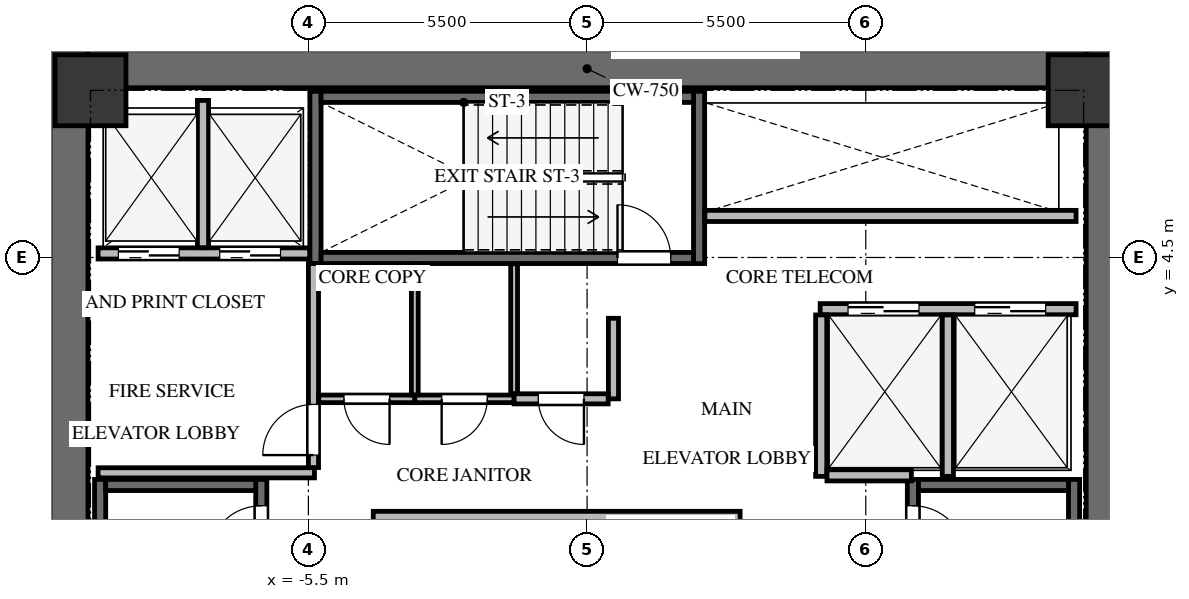
"""IFC4 building model, lengths in metres.
Left out: names, types, materials, properties, quantities, classifications, styles, units other than length and angle.
Written with IfcOpenShell. Run it as: python <this file> out.ifc"""

import sys

from ifc_helpers import new_model, si_unit, direction, frame, frame_2d, origin, origin_2d, place, context, subcontext, project, spatial, rectangle, extrude, source, transform, mapped, element, fill, save


model = new_model("IFC4")
c1 = context("Model", 3, precision=1e-05, world=origin(), true_north=direction((0.0, 1.0)))
c2 = subcontext(c1, "Body", "Model", "MODEL_VIEW")
j1 = project(units=[si_unit("LENGTHUNIT", "METRE"), si_unit("PLANEANGLEUNIT", "RADIAN")], contexts=[c1])
p1 = place(None, origin())
s1 = spatial("IfcSite", under=j1, at=p1, CompositionType="ELEMENT")
p2 = place(p1, origin())
s2 = spatial("IfcBuilding", under=s1, at=p2, CompositionType="ELEMENT")
p3 = place(p2, frame((0.0, 0.0, 146.1)))
s3 = spatial("IfcBuildingStorey", under=s2, at=p3, CompositionType="ELEMENT", Elevation=146.1)
for number, where, z_axis, x_axis in (
    (1, (-10.225, -8.6, 0.0), (0.0, 0.0, 1.0), (0.0, 1.0, 0.0)),
    (2, (10.225, -8.6, 0.0), (0.0, 0.0, 1.0), (0.0, 1.0, 0.0)),
):
    element("IfcWall", number, at=place(p3, frame(where, z_axis=z_axis, x_axis=x_axis)), inside=s3, PredefinedType="SHEAR", context=c2, shape_type="SweptSolid", body=[
        extrude(rectangle(XDim=17.2, YDim=0.75, at=frame_2d((8.6, 0.0))), origin(), (0.0, 0.0, 1.0), 4.2),
    ])
p4 = place(p3, frame((-9.85, 8.225, 0.0), z_axis=(0.0, 0.0, 1.0), x_axis=(1.0, 0.0, 0.0)))
e3 = element("IfcWall", 3, at=p4, inside=s3, PredefinedType="SHEAR", context=c2, shape_type="SweptSolid", body=[
    extrude(rectangle(XDim=19.7, YDim=0.75, at=frame_2d((9.85, 0.0))), origin(), (0.0, 0.0, 1.0), 4.2),
])
p5 = place(p3, frame((-6.43, -7.77, -0.24), z_axis=(0.0, 0.0, 1.0), x_axis=(0.0, 1.0, 0.0)))
e4 = element("IfcWall", 4, at=p5, inside=s3, PredefinedType="SHEAR", context=c2, shape_type="SweptSolid", body=[
    extrude(rectangle(XDim=7.89, YDim=0.22, at=frame_2d((3.945, 0.0))), origin(), (0.0, 0.0, 1.0), 4.12),
])
p6 = place(p5, frame((6.32, 0.0, 0.0)))
e5 = element("IfcOpeningElement", 5, at=p6, cuts=e4, PredefinedType="OPENING", context=c2, shape_type="SweptSolid", body=[
    extrude(rectangle(XDim=1.05, YDim=2.15, at=frame_2d((0.525, 1.075))), frame((0.0, 0.12, 0.0), z_axis=(0.0, -1.0, 0.0), x_axis=(1.0, 0.0, 0.0)), (0.0, 0.0, 1.0), 0.24),
])
p7 = place(p3, frame((-9.61, 0.12, -0.24), z_axis=(0.0, 0.0, 1.0), x_axis=(0.0, -1.0, 0.0)))
e6 = element("IfcWall", 6, at=p7, inside=s3, PredefinedType="SHEAR", context=c2, shape_type="SweptSolid", body=[
    extrude(rectangle(XDim=7.89, YDim=0.22, at=frame_2d((3.945, 0.0))), origin(), (0.0, 0.0, 1.0), 4.12),
])
p8 = place(p3, frame((-6.54, 0.01, -0.24), z_axis=(0.0, 0.0, 1.0), x_axis=(-1.0, 0.0, 0.0)))
e7 = element("IfcWall", 7, at=p8, inside=s3, PredefinedType="SHEAR", context=c2, shape_type="SweptSolid", body=[
    extrude(rectangle(XDim=2.96, YDim=0.22, at=frame_2d((1.48, 0.0))), origin(), (0.0, 0.0, 1.0), 4.12),
])
p9 = place(p3, frame((9.61, -7.77, -0.24), z_axis=(0.0, 0.0, 1.0), x_axis=(0.0, 1.0, 0.0)))
e8 = element("IfcWall", 8, at=p9, inside=s3, PredefinedType="SHEAR", context=c2, shape_type="SweptSolid", body=[
    extrude(rectangle(XDim=7.89, YDim=0.22, at=frame_2d((3.945, 0.0))), origin(), (0.0, 0.0, 1.0), 4.12),
])
p10 = place(p3, frame((6.43, 0.12, -0.24), z_axis=(0.0, 0.0, 1.0), x_axis=(0.0, -1.0, 0.0)))
e9 = element("IfcWall", 9, at=p10, inside=s3, PredefinedType="SHEAR", context=c2, shape_type="SweptSolid", body=[
    extrude(rectangle(XDim=7.89, YDim=0.22, at=frame_2d((3.945, 0.0))), origin(), (0.0, 0.0, 1.0), 4.12),
])
p11 = place(p10, frame((0.52, 0.0, 0.0)))
e10 = element("IfcOpeningElement", 10, at=p11, cuts=e9, PredefinedType="OPENING", context=c2, shape_type="SweptSolid", body=[
    extrude(rectangle(XDim=1.05, YDim=2.15, at=frame_2d((0.525, 1.075))), frame((0.0, 0.12, 0.0), z_axis=(0.0, -1.0, 0.0), x_axis=(1.0, 0.0, 0.0)), (0.0, 0.0, 1.0), 0.24),
])
p12 = place(p3, frame((9.5, 0.01, -0.24), z_axis=(0.0, 0.0, 1.0), x_axis=(-1.0, 0.0, 0.0)))
e11 = element("IfcWall", 11, at=p12, inside=s3, PredefinedType="SHEAR", context=c2, shape_type="SweptSolid", body=[
    extrude(rectangle(XDim=2.96, YDim=0.22, at=frame_2d((1.48, 0.0))), origin(), (0.0, 0.0, 1.0), 4.12),
])
for number, where, z_axis, x_axis in (
    (12, (2.21, 4.38, -0.24), (0.0, 0.0, 1.0), (0.0, 1.0, 0.0)),
    (13, (-5.36, 7.78, -0.24), (0.0, 0.0, 1.0), (0.0, -1.0, 0.0)),
):
    element("IfcWall", number, at=place(p3, frame(where, z_axis=z_axis, x_axis=x_axis)), inside=s3, PredefinedType="SHEAR", context=c2, shape_type="SweptSolid", body=[
        extrude(rectangle(XDim=3.4, YDim=0.22, at=frame_2d((1.7, 0.0))), origin(), (0.0, 0.0, 1.0), 4.12),
    ])
p13 = place(p3, frame((-5.25, 4.49, -0.24), z_axis=(0.0, 0.0, 1.0), x_axis=(1.0, 0.0, 0.0)))
e14 = element("IfcWall", 14, at=p13, inside=s3, PredefinedType="SHEAR", context=c2, shape_type="SweptSolid", body=[
    extrude(rectangle(XDim=7.35, YDim=0.22, at=frame_2d((3.675, 0.0))), origin(), (0.0, 0.0, 1.0), 4.12),
])
p14 = place(p13, frame((5.85, 0.0, 0.0)))
e15 = element("IfcOpeningElement", 15, at=p14, cuts=e14, PredefinedType="OPENING", context=c2, shape_type="SweptSolid", body=[
    extrude(rectangle(XDim=1.05, YDim=2.15, at=frame_2d((0.525, 1.075))), frame((0.0, 0.12, 0.0), z_axis=(0.0, -1.0, 0.0), x_axis=(1.0, 0.0, 0.0)), (0.0, 0.0, 1.0), 0.24),
])
p15 = place(p3, frame((2.1, 7.67, -0.24), z_axis=(0.0, 0.0, 1.0), x_axis=(-1.0, 0.0, 0.0)))
e16 = element("IfcWall", 16, at=p15, inside=s3, PredefinedType="SHEAR", context=c2, shape_type="SweptSolid", body=[
    extrude(rectangle(XDim=7.35, YDim=0.22, at=frame_2d((3.675, 0.0))), origin(), (0.0, 0.0, 1.0), 4.12),
])
m1 = source(origin(), c2, "Body", "SweptSolid", [
    extrude(rectangle(XDim=1.4, YDim=1.4, at=origin_2d()), origin(), (0.0, 0.0, 1.0), 4.12),
])
for number, where, z_axis, x_axis in (
    (17, (9.8, 7.8, -0.24), (0.0, 0.0, 1.0), (1.0, 0.0, 0.0)),
    (18, (-9.8, 7.8, -0.24), (0.0, 0.0, 1.0), (1.0, 0.0, 0.0)),
):
    element("IfcColumn", number, at=place(p3, frame(where, z_axis=z_axis, x_axis=x_axis)), inside=s3, PredefinedType="COLUMN", context=c2, shape_type="MappedRepresentation", body=[
        mapped(m1, transform((0.0, 0.0, 0.0), x_axis=(1.0, 0.0, 0.0), y_axis=(0.0, 1.0, 0.0), z_axis=(0.0, 0.0, 1.0), scale=1.0)),
    ])
p16 = place(p3, frame((-9.65, 4.58, 0.0), z_axis=(0.0, 0.0, 1.0), x_axis=(1.0, 0.0, 0.0)))
e19 = element("IfcWall", 19, at=p16, inside=s3, PredefinedType="SOLIDWALL", context=c2, shape_type="SweptSolid", body=[
    extrude(rectangle(XDim=4.175, YDim=0.22, at=frame_2d((2.087, 0.0))), origin(), (0.0, 0.0, 1.0), 3.865),
])
p17 = place(p16, frame((0.4, 0.0, 0.0)))
e20 = element("IfcOpeningElement", 20, at=p17, cuts=e19, PredefinedType="OPENING", context=c2, shape_type="SweptSolid", body=[
    extrude(rectangle(XDim=1.2, YDim=2.15, at=frame_2d((0.6, 1.075))), frame((0.0, 0.12, 0.0), z_axis=(0.0, -1.0, 0.0), x_axis=(1.0, 0.0, 0.0)), (0.0, 0.0, 1.0), 0.24),
])
p18 = place(p16, frame((2.4, 0.0, 0.0)))
e21 = element("IfcOpeningElement", 21, at=p18, cuts=e19, PredefinedType="OPENING", context=c2, shape_type="SweptSolid", body=[
    extrude(rectangle(XDim=1.2, YDim=2.15, at=frame_2d((0.6, 1.075))), frame((0.0, 0.12, 0.0), z_axis=(0.0, -1.0, 0.0), x_axis=(1.0, 0.0, 0.0)), (0.0, 0.0, 1.0), 0.24),
])
p19 = place(p3, frame((-7.58, 4.694, 0.0), z_axis=(0.0, 0.0, 1.0), x_axis=(0.0, 1.0, 0.0)))
e22 = element("IfcWall", 22, at=p19, inside=s3, PredefinedType="SOLIDWALL", context=c2, shape_type="SweptSolid", body=[
    extrude(rectangle(XDim=2.906, YDim=0.22, at=frame_2d((1.453, 0.0))), origin(), (0.0, 0.0, 1.0), 3.865),
])
p20 = place(p3, frame((-9.65, 0.25, 0.0), z_axis=(0.0, 0.0, 1.0), x_axis=(1.0, 0.0, 0.0)))
e23 = element("IfcWall", 23, at=p20, inside=s3, PredefinedType="SOLIDWALL", context=c2, shape_type="SweptSolid", body=[
    extrude(rectangle(XDim=4.27, YDim=0.2, at=frame_2d((2.135, 0.0))), origin(), (0.0, 0.0, 1.0), 3.865),
])
p21 = place(p3, frame((-5.4, 0.354, 0.0), z_axis=(0.0, 0.0, 1.0), x_axis=(0.0, 1.0, 0.0)))
e24 = element("IfcWall", 24, at=p21, inside=s3, PredefinedType="SOLIDWALL", context=c2, shape_type="SweptSolid", body=[
    extrude(rectangle(XDim=4.026, YDim=0.2, at=frame_2d((2.013, 0.0))), origin(), (0.0, 0.0, 1.0), 3.865),
])
p22 = place(p21, frame((0.246, 0.0, 0.0)))
e25 = element("IfcOpeningElement", 25, at=p22, cuts=e24, PredefinedType="OPENING", context=c2, shape_type="SweptSolid", body=[
    extrude(rectangle(XDim=1.0, YDim=2.15, at=frame_2d((0.5, 1.075))), frame((0.0, 0.11, 0.0), z_axis=(0.0, -1.0, 0.0), x_axis=(1.0, 0.0, 0.0)), (0.0, 0.0, 1.0), 0.22),
])
p23 = place(p3, frame((4.6, 3.48, 0.0), z_axis=(0.0, 0.0, 1.0), x_axis=(1.0, 0.0, 0.0)))
e26 = element("IfcWall", 26, at=p23, inside=s3, PredefinedType="SOLIDWALL", context=c2, shape_type="SweptSolid", body=[
    extrude(rectangle(XDim=5.05, YDim=0.22, at=frame_2d((2.525, 0.0))), origin(), (0.0, 0.0, 1.0), 3.865),
])
p24 = place(p23, frame((0.55, 0.0, 0.0)))
e27 = element("IfcOpeningElement", 27, at=p24, cuts=e26, PredefinedType="OPENING", context=c2, shape_type="SweptSolid", body=[
    extrude(rectangle(XDim=1.4, YDim=2.15, at=frame_2d((0.7, 1.075))), frame((0.0, 0.12, 0.0), z_axis=(0.0, -1.0, 0.0), x_axis=(1.0, 0.0, 0.0)), (0.0, 0.0, 1.0), 0.24),
])
p25 = place(p23, frame((3.05, 0.0, 0.0)))
e28 = element("IfcOpeningElement", 28, at=p25, cuts=e26, PredefinedType="OPENING", context=c2, shape_type="SweptSolid", body=[
    extrude(rectangle(XDim=1.4, YDim=2.15, at=frame_2d((0.7, 1.075))), frame((0.0, 0.12, 0.0), z_axis=(0.0, -1.0, 0.0), x_axis=(1.0, 0.0, 0.0)), (0.0, 0.0, 1.0), 0.24),
])
for number, where, z_axis, x_axis in (
    (29, (4.62, 0.18, 0.0), (0.0, 0.0, 1.0), (0.0, 1.0, 0.0)),
    (30, (7.12, 0.18, 0.0), (0.0, 0.0, 1.0), (0.0, 1.0, 0.0)),
):
    element("IfcWall", number, at=place(p3, frame(where, z_axis=z_axis, x_axis=x_axis)), inside=s3, PredefinedType="SOLIDWALL", context=c2, shape_type="SweptSolid", body=[
        extrude(rectangle(XDim=3.186, YDim=0.22, at=frame_2d((1.593, 0.0))), origin(), (0.0, 0.0, 1.0), 3.865),
    ])
p26 = place(p3, frame((4.734, 0.2, 0.0), z_axis=(0.0, 0.0, 1.0), x_axis=(1.0, 0.0, 0.0)))
e31 = element("IfcWall", 31, at=p26, inside=s3, PredefinedType="SOLIDWALL", context=c2, shape_type="SweptSolid", body=[
    extrude(rectangle(XDim=1.666, YDim=0.22, at=frame_2d((0.833, 0.0))), origin(), (0.0, 0.0, 1.0), 3.865),
])
p27 = place(p3, frame((-4.22, -0.62, 0.0), z_axis=(0.0, 0.0, 1.0), x_axis=(1.0, 0.0, 0.0)))
e32 = element("IfcWall", 32, at=p27, inside=s3, PredefinedType="SOLIDWALL", context=c2, shape_type="SweptSolid", body=[
    extrude(rectangle(XDim=7.24, YDim=0.22, at=frame_2d((3.62, 0.0))), origin(), (0.0, 0.0, 1.0), 3.865),
])
p28 = place(p3, frame((2.325, 5.32, 0.0), z_axis=(0.0, 0.0, 1.0), x_axis=(1.0, 0.0, 0.0)))
e33 = element("IfcWall", 33, at=p28, inside=s3, PredefinedType="SOLIDWALL", context=c2, shape_type="SweptSolid", body=[
    extrude(rectangle(XDim=7.325, YDim=0.22, at=frame_2d((3.663, 0.0))), origin(), (0.0, 0.0, 1.0), 3.865),
])
p29 = place(p3, frame((-3.4, 1.71, 0.0), z_axis=(0.0, 0.0, 1.0), x_axis=(-1.0, 0.0, 0.0)))
e34 = element("IfcWall", 34, at=p29, inside=s3, PredefinedType="PARTITIONING", context=c2, shape_type="SweptSolid", body=[
    extrude(rectangle(XDim=1.896, YDim=0.15, at=frame_2d((0.948, 0.0))), origin(), (0.0, 0.0, 1.0), 3.865),
])
p30 = place(p29, frame((0.498, 0.0, 0.0)))
e35 = element("IfcOpeningElement", 35, at=p30, cuts=e34, PredefinedType="OPENING", context=c2, shape_type="SweptSolid", body=[
    extrude(rectangle(XDim=0.9, YDim=2.05, at=frame_2d((0.45, 1.025))), frame((0.0, 0.085, 0.0), z_axis=(0.0, -1.0, 0.0), x_axis=(1.0, 0.0, 0.0)), (0.0, 0.0, 1.0), 0.17),
])
p31 = place(p3, frame((-1.44, 1.71, 0.0), z_axis=(0.0, 0.0, 1.0), x_axis=(-1.0, 0.0, 0.0)))
e36 = element("IfcWall", 36, at=p31, inside=s3, PredefinedType="PARTITIONING", context=c2, shape_type="SweptSolid", body=[
    extrude(rectangle(XDim=1.96, YDim=0.15, at=frame_2d((0.98, 0.0))), origin(), (0.0, 0.0, 1.0), 3.865),
])
p32 = place(p31, frame((0.53, 0.0, 0.0)))
e37 = element("IfcOpeningElement", 37, at=p32, cuts=e36, PredefinedType="OPENING", context=c2, shape_type="SweptSolid", body=[
    extrude(rectangle(XDim=0.9, YDim=2.05, at=frame_2d((0.45, 1.025))), frame((0.0, 0.085, 0.0), z_axis=(0.0, -1.0, 0.0), x_axis=(1.0, 0.0, 0.0)), (0.0, 0.0, 1.0), 0.17),
])
p33 = place(p3, frame((0.52, 3.3, 0.0), z_axis=(0.0, 0.0, 1.0), x_axis=(0.0, -1.0, 0.0)))
e38 = element("IfcWall", 38, at=p33, inside=s3, PredefinedType="SOLIDWALL", context=c2, shape_type="SweptSolid", body=[
    extrude(rectangle(XDim=1.59, YDim=0.2, at=frame_2d((0.795, 0.0))), origin(), (0.0, 0.0, 1.0), 3.865),
])
p34 = place(p3, frame((0.416, 1.71, 0.0), z_axis=(0.0, 0.0, 1.0), x_axis=(-1.0, 0.0, 0.0)))
e39 = element("IfcWall", 39, at=p34, inside=s3, PredefinedType="SOLIDWALL", context=c2, shape_type="SweptSolid", body=[
    extrude(rectangle(XDim=1.856, YDim=0.2, at=frame_2d((0.928, 0.0))), origin(), (0.0, 0.0, 1.0), 3.865),
])
p35 = place(p34, frame((0.478, 0.0, 0.0)))
e40 = element("IfcOpeningElement", 40, at=p35, cuts=e39, PredefinedType="OPENING", context=c2, shape_type="SweptSolid", body=[
    extrude(rectangle(XDim=0.9, YDim=2.05, at=frame_2d((0.45, 1.025))), frame((0.0, 0.11, 0.0), z_axis=(0.0, -1.0, 0.0), x_axis=(1.0, 0.0, 0.0)), (0.0, 0.0, 1.0), 0.22),
])
p36 = place(p3, frame((-3.4, 4.375, 0.0), z_axis=(0.0, 0.0, 1.0), x_axis=(0.0, -1.0, 0.0)))
e41 = element("IfcWall", 41, at=p36, inside=s3, PredefinedType="PARTITIONING", context=c2, shape_type="SweptSolid", body=[
    extrude(rectangle(XDim=2.586, YDim=0.135, at=frame_2d((1.293, 0.0))), origin(), (0.0, 0.0, 1.0), 3.865),
])
p37 = place(p3, frame((-1.44, 4.375, 0.0), z_axis=(0.0, 0.0, 1.0), x_axis=(0.0, -1.0, 0.0)))
e42 = element("IfcWall", 42, at=p37, inside=s3, PredefinedType="PARTITIONING", context=c2, shape_type="SweptSolid", body=[
    extrude(rectangle(XDim=2.561, YDim=0.135, at=frame_2d((1.281, 0.0))), origin(), (0.0, 0.0, 1.0), 3.865),
])
m2 = source(origin(), c2, "Body", "SweptSolid", [
    extrude(rectangle(XDim=1.05, YDim=2.15, at=frame_2d((0.525, 1.075))), frame((0.0, 0.025, 0.0), z_axis=(0.0, -1.0, 0.0), x_axis=(1.0, 0.0, 0.0)), (0.0, 0.0, 1.0), 0.05),
])
p38 = place(p6, origin())
e43 = element("IfcDoor", 43, at=p38, inside=s3, OperationType="SINGLE_SWING_LEFT", PredefinedType="DOOR", context=c2, shape_type="MappedRepresentation", body=[
    mapped(m2, transform((0.0, 0.0, 0.0), x_axis=(1.0, 0.0, 0.0), y_axis=(0.0, 1.0, 0.0), z_axis=(0.0, 0.0, 1.0), scale=1.0)),
])
fill(e5, e43)
m3 = source(origin(), c2, "Body", "SweptSolid", [
    extrude(rectangle(XDim=1.05, YDim=2.15, at=frame_2d((0.525, 1.075))), frame((0.0, 0.025, 0.0), z_axis=(0.0, -1.0, 0.0), x_axis=(1.0, 0.0, 0.0)), (0.0, 0.0, 1.0), 0.05),
])
p39 = place(p11, origin())
e44 = element("IfcDoor", 44, at=p39, inside=s3, OperationType="SINGLE_SWING_RIGHT", PredefinedType="DOOR", context=c2, shape_type="MappedRepresentation", body=[
    mapped(m3, transform((0.0, 0.0, 0.0), x_axis=(1.0, 0.0, 0.0), y_axis=(0.0, 1.0, 0.0), z_axis=(0.0, 0.0, 1.0), scale=1.0)),
])
fill(e10, e44)
p40 = place(p14, origin())
e45 = element("IfcDoor", 45, at=p40, inside=s3, OperationType="SINGLE_SWING_LEFT", PredefinedType="DOOR", context=c2, shape_type="MappedRepresentation", body=[
    mapped(m2, transform((0.0, 0.0, 0.0), x_axis=(1.0, 0.0, 0.0), y_axis=(0.0, 1.0, 0.0), z_axis=(0.0, 0.0, 1.0), scale=1.0)),
])
fill(e15, e45)
m4 = source(origin(), c2, "Body", "SweptSolid", [
    extrude(rectangle(XDim=1.2, YDim=2.15, at=frame_2d((0.6, 1.075))), frame((0.0, 0.025, 0.0), z_axis=(0.0, -1.0, 0.0), x_axis=(1.0, 0.0, 0.0)), (0.0, 0.0, 1.0), 0.05),
])
p41 = place(p17, origin())
e46 = element("IfcDoor", 46, at=p41, inside=s3, OperationType="DOUBLE_DOOR_SLIDING", PredefinedType="DOOR", context=c2, shape_type="MappedRepresentation", body=[
    mapped(m4, transform((0.0, 0.0, 0.0), x_axis=(1.0, 0.0, 0.0), y_axis=(0.0, 1.0, 0.0), z_axis=(0.0, 0.0, 1.0), scale=1.0)),
])
fill(e20, e46)
p42 = place(p18, origin())
e47 = element("IfcDoor", 47, at=p42, inside=s3, OperationType="DOUBLE_DOOR_SLIDING", PredefinedType="DOOR", context=c2, shape_type="MappedRepresentation", body=[
    mapped(m4, transform((0.0, 0.0, 0.0), x_axis=(1.0, 0.0, 0.0), y_axis=(0.0, 1.0, 0.0), z_axis=(0.0, 0.0, 1.0), scale=1.0)),
])
fill(e21, e47)
m5 = source(origin(), c2, "Body", "SweptSolid", [
    extrude(rectangle(XDim=1.0, YDim=2.15, at=frame_2d((0.5, 1.075))), frame((0.0, 0.025, 0.0), z_axis=(0.0, -1.0, 0.0), x_axis=(1.0, 0.0, 0.0)), (0.0, 0.0, 1.0), 0.05),
])
p43 = place(p22, origin())
e48 = element("IfcDoor", 48, at=p43, inside=s3, OperationType="SINGLE_SWING_LEFT", PredefinedType="DOOR", context=c2, shape_type="MappedRepresentation", body=[
    mapped(m5, transform((0.0, 0.0, 0.0), x_axis=(1.0, 0.0, 0.0), y_axis=(0.0, 1.0, 0.0), z_axis=(0.0, 0.0, 1.0), scale=1.0)),
])
fill(e25, e48)
m6 = source(origin(), c2, "Body", "SweptSolid", [
    extrude(rectangle(XDim=1.4, YDim=2.15, at=frame_2d((0.7, 1.075))), frame((0.0, 0.025, 0.0), z_axis=(0.0, -1.0, 0.0), x_axis=(1.0, 0.0, 0.0)), (0.0, 0.0, 1.0), 0.05),
])
p44 = place(p24, origin())
e49 = element("IfcDoor", 49, at=p44, inside=s3, OperationType="DOUBLE_DOOR_SLIDING", PredefinedType="DOOR", context=c2, shape_type="MappedRepresentation", body=[
    mapped(m6, transform((0.0, 0.0, 0.0), x_axis=(1.0, 0.0, 0.0), y_axis=(0.0, 1.0, 0.0), z_axis=(0.0, 0.0, 1.0), scale=1.0)),
])
fill(e27, e49)
p45 = place(p25, origin())
e50 = element("IfcDoor", 50, at=p45, inside=s3, OperationType="DOUBLE_DOOR_SLIDING", PredefinedType="DOOR", context=c2, shape_type="MappedRepresentation", body=[
    mapped(m6, transform((0.0, 0.0, 0.0), x_axis=(1.0, 0.0, 0.0), y_axis=(0.0, 1.0, 0.0), z_axis=(0.0, 0.0, 1.0), scale=1.0)),
])
fill(e28, e50)
m7 = source(origin(), c2, "Body", "SweptSolid", [
    extrude(rectangle(XDim=0.9, YDim=2.05, at=frame_2d((0.45, 1.025))), frame((0.0, 0.025, 0.0), z_axis=(0.0, -1.0, 0.0), x_axis=(1.0, 0.0, 0.0)), (0.0, 0.0, 1.0), 0.05),
])
p46 = place(p30, origin())
e51 = element("IfcDoor", 51, at=p46, inside=s3, OperationType="SINGLE_SWING_LEFT", PredefinedType="DOOR", context=c2, shape_type="MappedRepresentation", body=[
    mapped(m7, transform((0.0, 0.0, 0.0), x_axis=(1.0, 0.0, 0.0), y_axis=(0.0, 1.0, 0.0), z_axis=(0.0, 0.0, 1.0), scale=1.0)),
])
fill(e35, e51)
m8 = source(origin(), c2, "Body", "SweptSolid", [
    extrude(rectangle(XDim=0.9, YDim=2.05, at=frame_2d((0.45, 1.025))), frame((0.0, 0.025, 0.0), z_axis=(0.0, -1.0, 0.0), x_axis=(1.0, 0.0, 0.0)), (0.0, 0.0, 1.0), 0.05),
])
p47 = place(p32, origin())
e52 = element("IfcDoor", 52, at=p47, inside=s3, OperationType="SINGLE_SWING_RIGHT", PredefinedType="DOOR", context=c2, shape_type="MappedRepresentation", body=[
    mapped(m8, transform((0.0, 0.0, 0.0), x_axis=(1.0, 0.0, 0.0), y_axis=(0.0, 1.0, 0.0), z_axis=(0.0, 0.0, 1.0), scale=1.0)),
])
fill(e37, e52)
p48 = place(p35, origin())
e53 = element("IfcDoor", 53, at=p48, inside=s3, OperationType="SINGLE_SWING_LEFT", PredefinedType="DOOR", context=c2, shape_type="MappedRepresentation", body=[
    mapped(m7, transform((0.0, 0.0, 0.0), x_axis=(1.0, 0.0, 0.0), y_axis=(0.0, 1.0, 0.0), z_axis=(0.0, 0.0, 1.0), scale=1.0)),
])
fill(e40, e53)
save(model, sys.argv[1])
